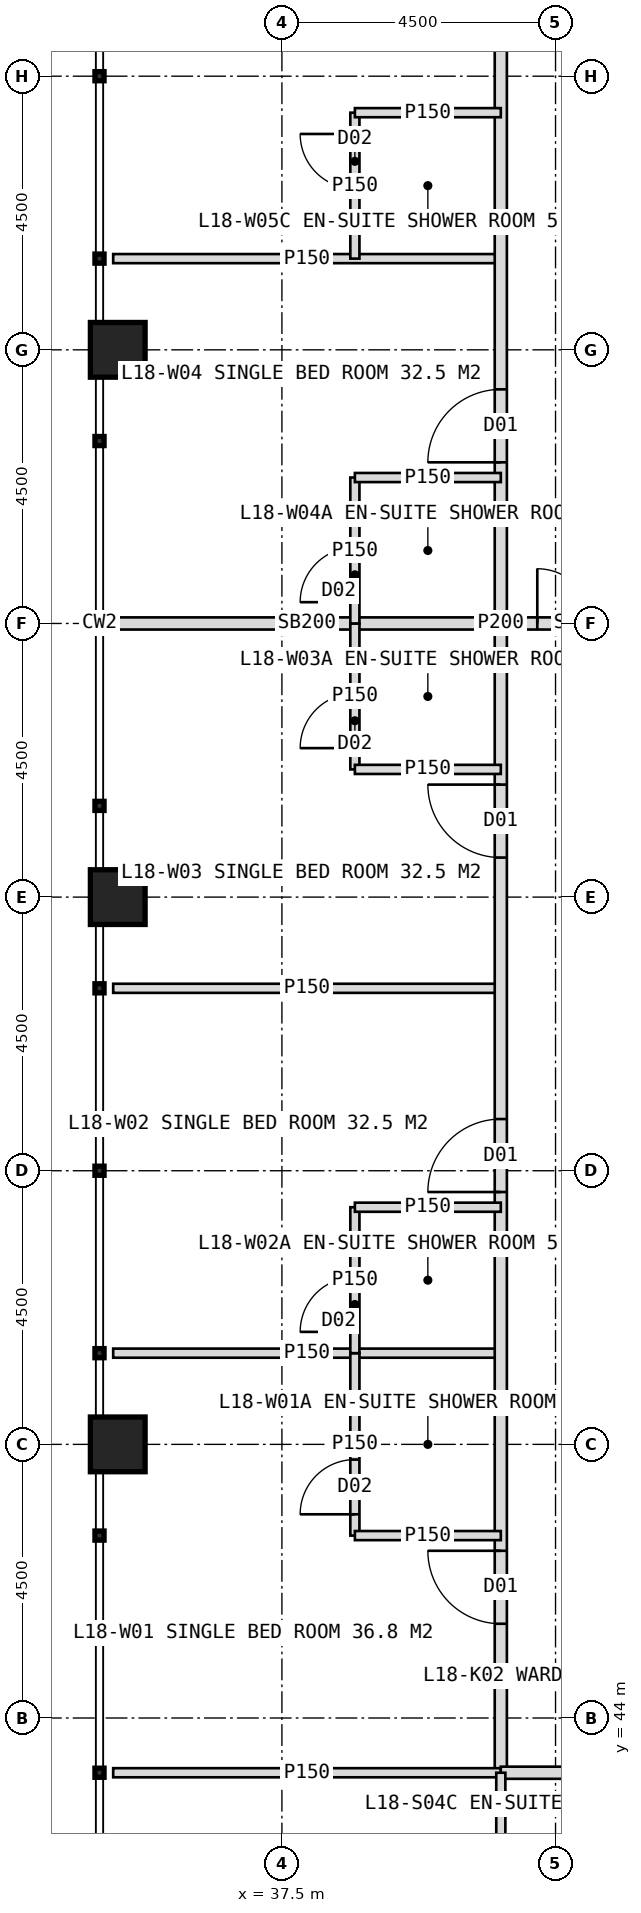
"""IFC4 building model, lengths in metres.
Left out: names, types, materials, properties, quantities, classifications, styles, units other than length and angle.
Written with IfcOpenShell. Run it as: python <this file> out.ifc"""

import sys

from ifc_helpers import new_model, si_unit, direction, frame, frame_2d, origin, origin_2d, place, context, subcontext, project, spatial, rectangle, hollow_rectangle, extrude, element, fill, save


model = new_model("IFC4")
c1 = context("Model", 3, precision=1e-05, world=origin(), true_north=direction((0.0, 1.0)))
c2 = subcontext(c1, "Body", "Model", "MODEL_VIEW")
j1 = project(units=[si_unit("LENGTHUNIT", "METRE"), si_unit("PLANEANGLEUNIT", "RADIAN")], contexts=[c1])
p1 = place(None, origin())
s1 = spatial("IfcSite", under=j1, at=p1, CompositionType="ELEMENT")
p2 = place(p1, origin())
s2 = spatial("IfcBuilding", under=s1, at=p2, CompositionType="ELEMENT")
p3 = place(p2, frame((0.0, 0.0, 79.0)))
s3 = spatial("IfcBuildingStorey", under=s2, at=p3, CompositionType="ELEMENT", Elevation=79.0)
for number, where, z_axis, x_axis in (
    (1, (34.8, 48.5, 0.0), (0.0, 0.0, 1.0), (1.0, 0.0, 0.0)),
    (2, (34.8, 57.5, 0.0), (0.0, 0.0, 1.0), (1.0, 0.0, 0.0)),
    (3, (34.8, 66.5, 0.0), (0.0, 0.0, 1.0), (1.0, 0.0, 0.0)),
):
    element("IfcColumn", number, at=place(p3, frame(where, z_axis=z_axis, x_axis=x_axis)), inside=s3, PredefinedType="COLUMN", context=c2, shape_type="SweptSolid", body=[
        extrude(hollow_rectangle(XDim=0.9, YDim=0.9, WallThickness=0.08, at=origin_2d()), origin(), (0.0, 0.0, 1.0), 4.0),
    ])
for number, where, z_axis, x_axis in (
    (4, (41.1, 50.0, 0.0), (0.0, 0.0, 1.0), (-1.0, 0.0, 0.0)),
    (5, (41.1, 56.0, 0.0), (0.0, 0.0, 1.0), (-1.0, 0.0, 0.0)),
):
    element("IfcWall", number, at=place(p3, frame(where, z_axis=z_axis, x_axis=x_axis)), inside=s3, PredefinedType="PARTITIONING", context=c2, shape_type="SweptSolid", body=[
        extrude(rectangle(XDim=6.375, YDim=0.15, at=frame_2d((3.188, 0.0))), origin(), (0.0, 0.0, 1.0), 3.75),
    ])
p4 = place(p3, frame((41.1, 62.0, 0.0), z_axis=(0.0, 0.0, 1.0), x_axis=(-1.0, 0.0, 0.0)))
e6 = element("IfcWall", 6, at=p4, inside=s3, PredefinedType="SOLIDWALL", context=c2, shape_type="SweptSolid", body=[
    extrude(rectangle(XDim=6.375, YDim=0.2, at=frame_2d((3.188, 0.0))), origin(), (0.0, 0.0, 1.0), 2.75),
])
p5 = place(p3, frame((41.1, 68.0, 0.0), z_axis=(0.0, 0.0, 1.0), x_axis=(-1.0, 0.0, 0.0)))
e7 = element("IfcWall", 7, at=p5, inside=s3, PredefinedType="PARTITIONING", context=c2, shape_type="SweptSolid", body=[
    extrude(rectangle(XDim=6.375, YDim=0.15, at=frame_2d((3.188, 0.0))), origin(), (0.0, 0.0, 1.0), 3.75),
])
p6 = place(p3, frame((41.1, 43.1, 0.0), z_axis=(0.0, 0.0, 1.0), x_axis=(0.0, 1.0, 0.0)))
e8 = element("IfcWall", 8, at=p6, inside=s3, PredefinedType="PARTITIONING", context=c2, shape_type="SweptSolid", body=[
    extrude(rectangle(XDim=37.8, YDim=0.2, at=frame_2d((18.9, 0.0))), origin(), (0.0, 0.0, 1.0), 3.75),
])
p7 = place(p6, frame((2.45, 0.0, 0.0)))
e9 = element("IfcOpeningElement", 9, at=p7, cuts=e8, PredefinedType="OPENING", context=c2, shape_type="SweptSolid", body=[
    extrude(rectangle(XDim=1.2, YDim=2.2, at=frame_2d((0.6, 1.1))), frame((0.0, 0.11, 0.0), z_axis=(0.0, -1.0, 0.0), x_axis=(1.0, 0.0, 0.0)), (0.0, 0.0, 1.0), 0.22),
])
p8 = place(p6, frame((9.55, 0.0, 0.0)))
e10 = element("IfcOpeningElement", 10, at=p8, cuts=e8, PredefinedType="OPENING", context=c2, shape_type="SweptSolid", body=[
    extrude(rectangle(XDim=1.2, YDim=2.2, at=frame_2d((0.6, 1.1))), frame((0.0, 0.11, 0.0), z_axis=(0.0, -1.0, 0.0), x_axis=(1.0, 0.0, 0.0)), (0.0, 0.0, 1.0), 0.22),
])
p9 = place(p6, frame((15.05, 0.0, 0.0)))
e11 = element("IfcOpeningElement", 11, at=p9, cuts=e8, PredefinedType="OPENING", context=c2, shape_type="SweptSolid", body=[
    extrude(rectangle(XDim=1.2, YDim=2.2, at=frame_2d((0.6, 1.1))), frame((0.0, 0.11, 0.0), z_axis=(0.0, -1.0, 0.0), x_axis=(1.0, 0.0, 0.0)), (0.0, 0.0, 1.0), 0.22),
])
p10 = place(p6, frame((21.55, 0.0, 0.0)))
e12 = element("IfcOpeningElement", 12, at=p10, cuts=e8, PredefinedType="OPENING", context=c2, shape_type="SweptSolid", body=[
    extrude(rectangle(XDim=1.2, YDim=2.2, at=frame_2d((0.6, 1.1))), frame((0.0, 0.11, 0.0), z_axis=(0.0, -1.0, 0.0), x_axis=(1.0, 0.0, 0.0)), (0.0, 0.0, 1.0), 0.22),
])
p11 = place(p6, frame((33.95, 0.0, 0.0)))
e13 = element("IfcOpeningElement", 13, at=p11, cuts=e8, PredefinedType="OPENING", context=c2, shape_type="SweptSolid", body=[
    extrude(rectangle(XDim=1.2, YDim=2.2, at=frame_2d((0.6, 1.1))), frame((0.0, 0.11, 0.0), z_axis=(0.0, -1.0, 0.0), x_axis=(1.0, 0.0, 0.0)), (0.0, 0.0, 1.0), 0.22),
])
p12 = place(p3, frame((41.1, 43.1, 0.0), z_axis=(0.0, 0.0, 1.0), x_axis=(-1.0, 0.0, 0.0)))
e14 = element("IfcWall", 14, at=p12, inside=s3, PredefinedType="PARTITIONING", context=c2, shape_type="SweptSolid", body=[
    extrude(rectangle(XDim=6.375, YDim=0.15, at=frame_2d((3.188, 0.0))), origin(), (0.0, 0.0, 1.0), 3.75),
])
p13 = place(p3, frame((38.7, 47.0, 0.0), z_axis=(0.0, 0.0, 1.0), x_axis=(0.0, 1.0, 0.0)))
e15 = element("IfcWall", 15, at=p13, inside=s3, PredefinedType="PARTITIONING", context=c2, shape_type="SweptSolid", body=[
    extrude(rectangle(XDim=3.0, YDim=0.15, at=frame_2d((1.5, 0.0))), origin(), (0.0, 0.0, 1.0), 3.75),
])
p14 = place(p13, frame((0.35, 0.0, 0.0)))
e16 = element("IfcOpeningElement", 16, at=p14, cuts=e15, PredefinedType="OPENING", context=c2, shape_type="SweptSolid", body=[
    extrude(rectangle(XDim=0.9, YDim=2.1, at=frame_2d((0.45, 1.05))), frame((0.0, 0.085, 0.0), z_axis=(0.0, -1.0, 0.0), x_axis=(1.0, 0.0, 0.0)), (0.0, 0.0, 1.0), 0.17),
])
p15 = place(p3, frame((41.1, 47.0, 0.0), z_axis=(0.0, 0.0, 1.0), x_axis=(-1.0, 0.0, 0.0)))
e17 = element("IfcWall", 17, at=p15, inside=s3, PredefinedType="PARTITIONING", context=c2, shape_type="SweptSolid", body=[
    extrude(rectangle(XDim=2.4, YDim=0.15, at=frame_2d((1.2, 0.0))), origin(), (0.0, 0.0, 1.0), 3.75),
])
p16 = place(p3, frame((38.7, 50.0, 0.0), z_axis=(0.0, 0.0, 1.0), x_axis=(0.0, 1.0, 0.0)))
e18 = element("IfcWall", 18, at=p16, inside=s3, PredefinedType="PARTITIONING", context=c2, shape_type="SweptSolid", body=[
    extrude(rectangle(XDim=2.4, YDim=0.15, at=frame_2d((1.2, 0.0))), origin(), (0.0, 0.0, 1.0), 3.75),
])
p17 = place(p16, frame((0.35, 0.0, 0.0)))
e19 = element("IfcOpeningElement", 19, at=p17, cuts=e18, PredefinedType="OPENING", context=c2, shape_type="SweptSolid", body=[
    extrude(rectangle(XDim=0.9, YDim=2.1, at=frame_2d((0.45, 1.05))), frame((0.0, 0.085, 0.0), z_axis=(0.0, -1.0, 0.0), x_axis=(1.0, 0.0, 0.0)), (0.0, 0.0, 1.0), 0.17),
])
p18 = place(p3, frame((41.1, 52.4, 0.0), z_axis=(0.0, 0.0, 1.0), x_axis=(-1.0, 0.0, 0.0)))
e20 = element("IfcWall", 20, at=p18, inside=s3, PredefinedType="PARTITIONING", context=c2, shape_type="SweptSolid", body=[
    extrude(rectangle(XDim=2.4, YDim=0.15, at=frame_2d((1.2, 0.0))), origin(), (0.0, 0.0, 1.0), 3.75),
])
p19 = place(p3, frame((38.7, 59.6, 0.0), z_axis=(0.0, 0.0, 1.0), x_axis=(0.0, 1.0, 0.0)))
e21 = element("IfcWall", 21, at=p19, inside=s3, PredefinedType="PARTITIONING", context=c2, shape_type="SweptSolid", body=[
    extrude(rectangle(XDim=2.4, YDim=0.15, at=frame_2d((1.2, 0.0))), origin(), (0.0, 0.0, 1.0), 3.75),
])
p20 = place(p19, frame((0.35, 0.0, 0.0)))
e22 = element("IfcOpeningElement", 22, at=p20, cuts=e21, PredefinedType="OPENING", context=c2, shape_type="SweptSolid", body=[
    extrude(rectangle(XDim=0.9, YDim=2.1, at=frame_2d((0.45, 1.05))), frame((0.0, 0.085, 0.0), z_axis=(0.0, -1.0, 0.0), x_axis=(1.0, 0.0, 0.0)), (0.0, 0.0, 1.0), 0.17),
])
p21 = place(p3, frame((41.1, 59.6, 0.0), z_axis=(0.0, 0.0, 1.0), x_axis=(-1.0, 0.0, 0.0)))
e23 = element("IfcWall", 23, at=p21, inside=s3, PredefinedType="PARTITIONING", context=c2, shape_type="SweptSolid", body=[
    extrude(rectangle(XDim=2.4, YDim=0.15, at=frame_2d((1.2, 0.0))), origin(), (0.0, 0.0, 1.0), 3.75),
])
p22 = place(p3, frame((38.7, 62.0, 0.0), z_axis=(0.0, 0.0, 1.0), x_axis=(0.0, 1.0, 0.0)))
e24 = element("IfcWall", 24, at=p22, inside=s3, PredefinedType="PARTITIONING", context=c2, shape_type="SweptSolid", body=[
    extrude(rectangle(XDim=2.4, YDim=0.15, at=frame_2d((1.2, 0.0))), origin(), (0.0, 0.0, 1.0), 3.75),
])
p23 = place(p22, frame((0.35, 0.0, 0.0)))
e25 = element("IfcOpeningElement", 25, at=p23, cuts=e24, PredefinedType="OPENING", context=c2, shape_type="SweptSolid", body=[
    extrude(rectangle(XDim=0.9, YDim=2.1, at=frame_2d((0.45, 1.05))), frame((0.0, 0.085, 0.0), z_axis=(0.0, -1.0, 0.0), x_axis=(1.0, 0.0, 0.0)), (0.0, 0.0, 1.0), 0.17),
])
p24 = place(p3, frame((41.1, 64.4, 0.0), z_axis=(0.0, 0.0, 1.0), x_axis=(-1.0, 0.0, 0.0)))
e26 = element("IfcWall", 26, at=p24, inside=s3, PredefinedType="PARTITIONING", context=c2, shape_type="SweptSolid", body=[
    extrude(rectangle(XDim=2.4, YDim=0.15, at=frame_2d((1.2, 0.0))), origin(), (0.0, 0.0, 1.0), 3.75),
])
p25 = place(p3, frame((38.7, 68.0, 0.0), z_axis=(0.0, 0.0, 1.0), x_axis=(0.0, 1.0, 0.0)))
e27 = element("IfcWall", 27, at=p25, inside=s3, PredefinedType="PARTITIONING", context=c2, shape_type="SweptSolid", body=[
    extrude(rectangle(XDim=2.4, YDim=0.15, at=frame_2d((1.2, 0.0))), origin(), (0.0, 0.0, 1.0), 3.75),
])
p26 = place(p25, frame((1.15, 0.0, 0.0)))
e28 = element("IfcOpeningElement", 28, at=p26, cuts=e27, PredefinedType="OPENING", context=c2, shape_type="SweptSolid", body=[
    extrude(rectangle(XDim=0.9, YDim=2.1, at=frame_2d((0.45, 1.05))), frame((0.0, 0.085, 0.0), z_axis=(0.0, -1.0, 0.0), x_axis=(1.0, 0.0, 0.0)), (0.0, 0.0, 1.0), 0.17),
])
p27 = place(p3, frame((41.1, 70.4, 0.0), z_axis=(0.0, 0.0, 1.0), x_axis=(-1.0, 0.0, 0.0)))
e29 = element("IfcWall", 29, at=p27, inside=s3, PredefinedType="PARTITIONING", context=c2, shape_type="SweptSolid", body=[
    extrude(rectangle(XDim=2.4, YDim=0.15, at=frame_2d((1.2, 0.0))), origin(), (0.0, 0.0, 1.0), 3.75),
])
p28 = place(p3, frame((78.9, 43.1, 0.0), z_axis=(0.0, 0.0, 1.0), x_axis=(-1.0, 0.0, 0.0)))
e30 = element("IfcWall", 30, at=p28, inside=s3, PredefinedType="PARTITIONING", context=c2, shape_type="SweptSolid", body=[
    extrude(rectangle(XDim=37.8, YDim=0.2, at=frame_2d((18.9, 0.0))), origin(), (0.0, 0.0, 1.0), 3.75),
])
p29 = place(p28, frame((6.05, 0.0, 0.0)))
e31 = element("IfcOpeningElement", 31, at=p29, cuts=e30, PredefinedType="OPENING", context=c2, shape_type="SweptSolid", body=[
    extrude(rectangle(XDim=1.2, YDim=2.2, at=frame_2d((0.6, 1.1))), frame((0.0, 0.11, 0.0), z_axis=(0.0, -1.0, 0.0), x_axis=(1.0, 0.0, 0.0)), (0.0, 0.0, 1.0), 0.22),
])
p30 = place(p28, frame((12.55, 0.0, 0.0)))
e32 = element("IfcOpeningElement", 32, at=p30, cuts=e30, PredefinedType="OPENING", context=c2, shape_type="SweptSolid", body=[
    extrude(rectangle(XDim=1.2, YDim=2.2, at=frame_2d((0.6, 1.1))), frame((0.0, 0.11, 0.0), z_axis=(0.0, -1.0, 0.0), x_axis=(1.0, 0.0, 0.0)), (0.0, 0.0, 1.0), 0.22),
])
p31 = place(p28, frame((21.05, 0.0, 0.0)))
e33 = element("IfcOpeningElement", 33, at=p31, cuts=e30, PredefinedType="OPENING", context=c2, shape_type="SweptSolid", body=[
    extrude(rectangle(XDim=1.2, YDim=2.2, at=frame_2d((0.6, 1.1))), frame((0.0, 0.11, 0.0), z_axis=(0.0, -1.0, 0.0), x_axis=(1.0, 0.0, 0.0)), (0.0, 0.0, 1.0), 0.22),
])
p32 = place(p28, frame((27.55, 0.0, 0.0)))
e34 = element("IfcOpeningElement", 34, at=p32, cuts=e30, PredefinedType="OPENING", context=c2, shape_type="SweptSolid", body=[
    extrude(rectangle(XDim=1.2, YDim=2.2, at=frame_2d((0.6, 1.1))), frame((0.0, 0.11, 0.0), z_axis=(0.0, -1.0, 0.0), x_axis=(1.0, 0.0, 0.0)), (0.0, 0.0, 1.0), 0.22),
])
p33 = place(p3, frame((41.1, 43.1, 0.0), z_axis=(0.0, 0.0, 1.0), x_axis=(0.0, -1.0, 0.0)))
e35 = element("IfcWall", 35, at=p33, inside=s3, PredefinedType="PARTITIONING", context=c2, shape_type="SweptSolid", body=[
    extrude(rectangle(XDim=2.4, YDim=0.15, at=frame_2d((1.2, 0.0))), origin(), (0.0, 0.0, 1.0), 3.75),
])
p34 = place(p3, frame((43.8, 62.0, 0.0), z_axis=(0.0, 0.0, 1.0), x_axis=(-1.0, 0.0, 0.0)))
e36 = element("IfcWall", 36, at=p34, inside=s3, PredefinedType="SOLIDWALL", context=c2, shape_type="SweptSolid", body=[
    extrude(rectangle(XDim=2.7, YDim=0.2, at=frame_2d((1.35, 0.0))), origin(), (0.0, 0.0, 1.0), 2.75),
])
p35 = place(p34, frame((0.3, 0.0, 0.0)))
e37 = element("IfcOpeningElement", 37, at=p35, cuts=e36, PredefinedType="OPENING", context=c2, shape_type="SweptSolid", body=[
    extrude(rectangle(XDim=1.8, YDim=2.2, at=frame_2d((0.9, 1.1))), frame((0.0, 0.11, 0.0), z_axis=(0.0, -1.0, 0.0), x_axis=(1.0, 0.0, 0.0)), (0.0, 0.0, 1.0), 0.22),
])
p36 = place(p7, origin())
e38 = element("IfcDoor", 38, at=p36, inside=s3, OperationType="SINGLE_SWING_RIGHT", PredefinedType="DOOR", context=c2, shape_type="SweptSolid", body=[
    extrude(rectangle(XDim=1.2, YDim=2.2, at=frame_2d((0.6, 1.1))), frame((0.0, 0.025, 0.0), z_axis=(0.0, -1.0, 0.0), x_axis=(1.0, 0.0, 0.0)), (0.0, 0.0, 1.0), 0.05),
])
fill(e9, e38)
p37 = place(p14, origin())
e39 = element("IfcDoor", 39, at=p37, inside=s3, OperationType="SINGLE_SWING_LEFT", PredefinedType="DOOR", context=c2, shape_type="SweptSolid", body=[
    extrude(rectangle(XDim=0.9, YDim=2.1, at=frame_2d((0.45, 1.05))), frame((0.0, 0.025, 0.0), z_axis=(0.0, -1.0, 0.0), x_axis=(1.0, 0.0, 0.0)), (0.0, 0.0, 1.0), 0.05),
])
fill(e16, e39)
p38 = place(p8, origin())
e40 = element("IfcDoor", 40, at=p38, inside=s3, OperationType="SINGLE_SWING_LEFT", PredefinedType="DOOR", context=c2, shape_type="SweptSolid", body=[
    extrude(rectangle(XDim=1.2, YDim=2.2, at=frame_2d((0.6, 1.1))), frame((0.0, 0.025, 0.0), z_axis=(0.0, -1.0, 0.0), x_axis=(1.0, 0.0, 0.0)), (0.0, 0.0, 1.0), 0.05),
])
fill(e10, e40)
p39 = place(p17, origin())
e41 = element("IfcDoor", 41, at=p39, inside=s3, OperationType="SINGLE_SWING_LEFT", PredefinedType="DOOR", context=c2, shape_type="SweptSolid", body=[
    extrude(rectangle(XDim=0.9, YDim=2.1, at=frame_2d((0.45, 1.05))), frame((0.0, 0.025, 0.0), z_axis=(0.0, -1.0, 0.0), x_axis=(1.0, 0.0, 0.0)), (0.0, 0.0, 1.0), 0.05),
])
fill(e19, e41)
p40 = place(p9, origin())
e42 = element("IfcDoor", 42, at=p40, inside=s3, OperationType="SINGLE_SWING_RIGHT", PredefinedType="DOOR", context=c2, shape_type="SweptSolid", body=[
    extrude(rectangle(XDim=1.2, YDim=2.2, at=frame_2d((0.6, 1.1))), frame((0.0, 0.025, 0.0), z_axis=(0.0, -1.0, 0.0), x_axis=(1.0, 0.0, 0.0)), (0.0, 0.0, 1.0), 0.05),
])
fill(e11, e42)
p41 = place(p20, origin())
e43 = element("IfcDoor", 43, at=p41, inside=s3, OperationType="SINGLE_SWING_LEFT", PredefinedType="DOOR", context=c2, shape_type="SweptSolid", body=[
    extrude(rectangle(XDim=0.9, YDim=2.1, at=frame_2d((0.45, 1.05))), frame((0.0, 0.025, 0.0), z_axis=(0.0, -1.0, 0.0), x_axis=(1.0, 0.0, 0.0)), (0.0, 0.0, 1.0), 0.05),
])
fill(e22, e43)
p42 = place(p10, origin())
e44 = element("IfcDoor", 44, at=p42, inside=s3, OperationType="SINGLE_SWING_LEFT", PredefinedType="DOOR", context=c2, shape_type="SweptSolid", body=[
    extrude(rectangle(XDim=1.2, YDim=2.2, at=frame_2d((0.6, 1.1))), frame((0.0, 0.025, 0.0), z_axis=(0.0, -1.0, 0.0), x_axis=(1.0, 0.0, 0.0)), (0.0, 0.0, 1.0), 0.05),
])
fill(e12, e44)
p43 = place(p23, origin())
e45 = element("IfcDoor", 45, at=p43, inside=s3, OperationType="SINGLE_SWING_LEFT", PredefinedType="DOOR", context=c2, shape_type="SweptSolid", body=[
    extrude(rectangle(XDim=0.9, YDim=2.1, at=frame_2d((0.45, 1.05))), frame((0.0, 0.025, 0.0), z_axis=(0.0, -1.0, 0.0), x_axis=(1.0, 0.0, 0.0)), (0.0, 0.0, 1.0), 0.05),
])
fill(e25, e45)
p44 = place(p26, origin())
e46 = element("IfcDoor", 46, at=p44, inside=s3, OperationType="SINGLE_SWING_RIGHT", PredefinedType="DOOR", context=c2, shape_type="SweptSolid", body=[
    extrude(rectangle(XDim=0.9, YDim=2.1, at=frame_2d((0.45, 1.05))), frame((0.0, 0.025, 0.0), z_axis=(0.0, -1.0, 0.0), x_axis=(1.0, 0.0, 0.0)), (0.0, 0.0, 1.0), 0.05),
])
fill(e28, e46)
p45 = place(p35, origin())
e47 = element("IfcDoor", 47, at=p45, inside=s3, OperationType="DOUBLE_DOOR_DOUBLE_SWING", PredefinedType="DOOR", context=c2, shape_type="SweptSolid", body=[
    extrude(rectangle(XDim=1.8, YDim=2.2, at=frame_2d((0.9, 1.1))), frame((0.0, 0.025, 0.0), z_axis=(0.0, -1.0, 0.0), x_axis=(1.0, 0.0, 0.0)), (0.0, 0.0, 1.0), 0.05),
])
fill(e37, e47)
save(model, sys.argv[1])
